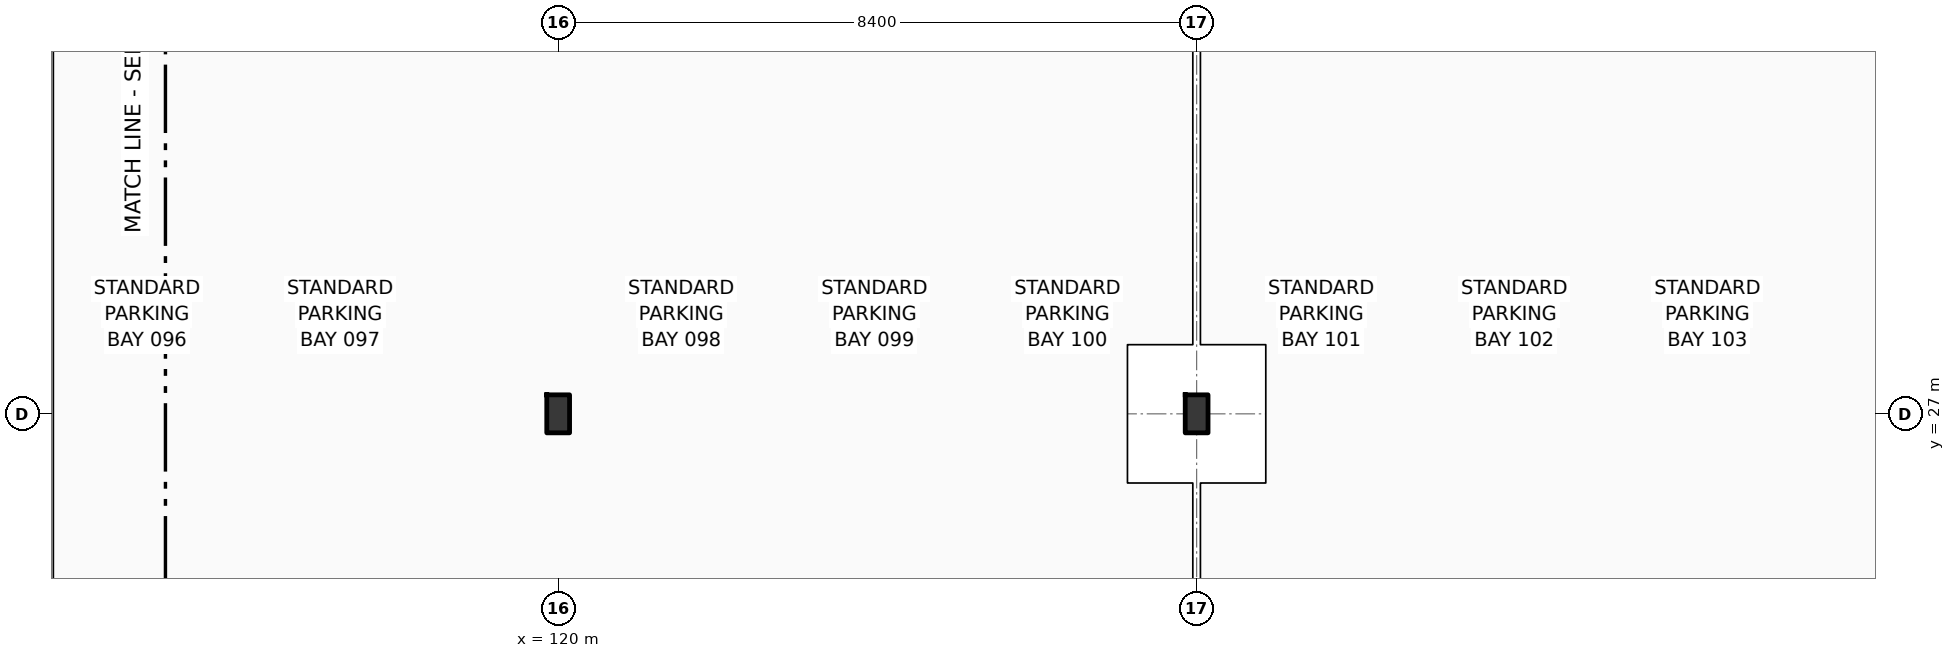
"""IFC4 building model, lengths in metres.
Left out: names, types, materials, properties, quantities, classifications, styles, units other than length and angle.
Written with IfcOpenShell. Run it as: python <this file> out.ifc"""

import sys

from ifc_helpers import new_model, si_unit, direction, frame, origin, origin_2d, place, context, subcontext, project, spatial, i_section, extrude, element, save


model = new_model("IFC4")
c1 = context("Model", 3, precision=1e-05, world=origin(), true_north=direction((0.0, 1.0)))
c2 = subcontext(c1, "Body", "Model", "MODEL_VIEW")
j1 = project(units=[si_unit("LENGTHUNIT", "METRE"), si_unit("PLANEANGLEUNIT", "RADIAN")], contexts=[c1])
p1 = place(None, origin())
s1 = spatial("IfcSite", under=j1, at=p1, CompositionType="ELEMENT")
p2 = place(p1, origin())
s2 = spatial("IfcBuilding", under=s1, at=p2, CompositionType="ELEMENT")
p3 = place(p2, frame((0.0, 0.0, -4.5)))
s3 = spatial("IfcBuildingStorey", under=s2, at=p3, CompositionType="ELEMENT", Elevation=-4.5)
for number, where, z_axis, x_axis in (
    (1, (120.0, 27.0, 0.0), (0.0, 0.0, 1.0), (1.0, 0.0, 0.0)),
    (2, (128.4, 27.0, 0.0), (0.0, 0.0, 1.0), (1.0, 0.0, 0.0)),
):
    element("IfcColumn", number, at=place(p3, frame(where, z_axis=z_axis, x_axis=x_axis)), inside=s3, PredefinedType="COLUMN", context=c2, shape_type="SweptSolid", body=[
        extrude(i_section(OverallWidth=0.3, OverallDepth=0.5, WebThickness=0.014, FlangeThickness=0.028, FilletRadius=0.027, at=origin_2d()), origin(), (0.0, 0.0, 1.0), 4.5),
    ])
save(model, sys.argv[1])
